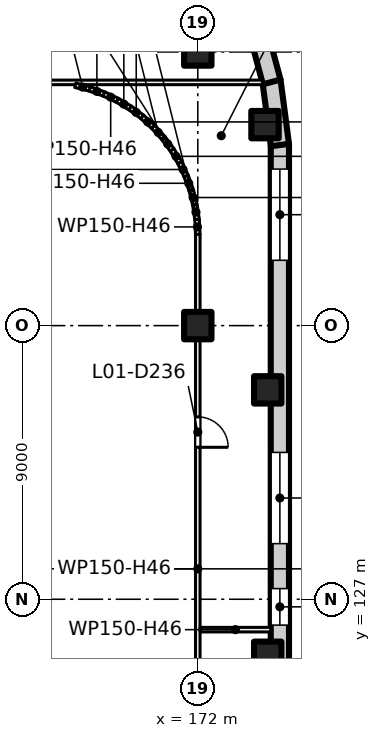
"""IFC4 building model, lengths in metres.
Left out: names, types, materials, properties, quantities, classifications, styles, units other than length and angle.
Written with IfcOpenShell. Run it as: python <this file> out.ifc"""

import sys

from ifc_helpers import new_model, si_unit, direction, frame, frame_2d, origin, origin_2d, place, context, subcontext, project, spatial, rectangle, extrude, element, fill, save


model = new_model("IFC4")
c1 = context("Model", 3, precision=1e-05, world=origin(), true_north=direction((0.0, 1.0)))
c2 = subcontext(c1, "Body", "Model", "MODEL_VIEW")
j1 = project(units=[si_unit("LENGTHUNIT", "METRE"), si_unit("PLANEANGLEUNIT", "RADIAN")], contexts=[c1])
p1 = place(None, origin())
s1 = spatial("IfcSite", under=j1, at=p1, CompositionType="ELEMENT")
p2 = place(p1, origin())
s2 = spatial("IfcBuilding", under=s1, at=p2, CompositionType="ELEMENT")
p3 = place(p2, frame((0.0, 0.0, 7.5)))
s3 = spatial("IfcBuildingStorey", under=s2, at=p3, CompositionType="ELEMENT", Elevation=7.5)
for number, where, z_axis, x_axis in (
    (1, (172.0, 136.0, 0.0), (0.0, 0.0, 1.0), (1.0, 0.0, 0.0)),
    (2, (172.0, 145.0, 0.0), (0.0, 0.0, 1.0), (1.0, 0.0, 0.0)),
    (3, (174.211, 142.611, 0.0), (0.0, 0.0, 1.0), (1.0, 0.0, 0.0)),
    (4, (174.3, 133.887, 0.0), (0.0, 0.0, 1.0), (1.0, 0.0, 0.0)),
    (5, (174.3, 125.157, 0.0), (0.0, 0.0, 1.0), (1.0, 0.0, 0.0)),
):
    element("IfcColumn", number, at=place(p3, frame(where, z_axis=z_axis, x_axis=x_axis)), inside=s3, PredefinedType="COLUMN", context=c2, shape_type="SweptSolid", body=[
        extrude(rectangle(XDim=0.9, YDim=0.9, at=origin_2d()), origin(), (0.0, 0.0, 1.0), 5.0),
    ])
p4 = place(p3, frame((174.7, 141.978, 0.0), z_axis=(0.0, 0.0, 1.0), x_axis=(0.0, -1.0, 0.0)))
e6 = element("IfcWall", 6, at=p4, inside=s3, PredefinedType="SOLIDWALL", context=c2, shape_type="SweptSolid", body=[
    extrude(rectangle(XDim=27.957, YDim=0.6, at=frame_2d((13.978, 0.0))), origin(), (0.0, 0.0, 1.0), 4.6),
])
p5 = place(p4, frame((0.83, 0.0, 0.9)))
e7 = element("IfcOpeningElement", 7, at=p5, cuts=e6, PredefinedType="OPENING", context=c2, shape_type="SweptSolid", body=[
    extrude(rectangle(XDim=3.0, YDim=3.0, at=frame_2d((1.5, 1.5))), frame((0.0, 0.31, 0.0), z_axis=(0.0, -1.0, 0.0), x_axis=(1.0, 0.0, 0.0)), (0.0, 0.0, 1.0), 0.62),
])
p6 = place(p4, frame((10.148, 0.0, 0.9)))
e8 = element("IfcOpeningElement", 8, at=p6, cuts=e6, PredefinedType="OPENING", context=c2, shape_type="SweptSolid", body=[
    extrude(rectangle(XDim=3.0, YDim=3.0, at=frame_2d((1.5, 1.5))), frame((0.0, 0.31, 0.0), z_axis=(0.0, -1.0, 0.0), x_axis=(1.0, 0.0, 0.0)), (0.0, 0.0, 1.0), 0.62),
])
p7 = place(p4, frame((14.628, 0.0, 0.9)))
e9 = element("IfcOpeningElement", 9, at=p7, cuts=e6, PredefinedType="OPENING", context=c2, shape_type="SweptSolid", body=[
    extrude(rectangle(XDim=1.2, YDim=3.0, at=frame_2d((0.6, 1.5))), frame((0.0, 0.31, 0.0), z_axis=(0.0, -1.0, 0.0), x_axis=(1.0, 0.0, 0.0)), (0.0, 0.0, 1.0), 0.62),
])
p8 = place(p4, frame((19.467, 0.0, 0.9)))
e10 = element("IfcOpeningElement", 10, at=p8, cuts=e6, PredefinedType="OPENING", context=c2, shape_type="SweptSolid", body=[
    extrude(rectangle(XDim=3.0, YDim=3.0, at=frame_2d((1.5, 1.5))), frame((0.0, 0.31, 0.0), z_axis=(0.0, -1.0, 0.0), x_axis=(1.0, 0.0, 0.0)), (0.0, 0.0, 1.0), 0.62),
])
p9 = place(p3, frame((174.424, 144.052, 0.0), z_axis=(0.0, 0.0, 1.0), x_axis=(0.130558200013, -0.991440646942, 0.0)))
e11 = element("IfcWall", 11, at=p9, inside=s3, PredefinedType="SOLIDWALL", context=c2, shape_type="SweptSolid", body=[
    extrude(rectangle(XDim=2.132, YDim=0.6, at=frame_2d((1.066, 0.0))), origin(), (0.0, 0.0, 1.0), 4.6),
])
p10 = place(p3, frame((173.908, 145.968, 0.0), z_axis=(0.0, 0.0, 1.0), x_axis=(0.258804467146, -0.965929732323, 0.0)))
e12 = element("IfcWall", 12, at=p10, inside=s3, PredefinedType="SOLIDWALL", context=c2, shape_type="SweptSolid", body=[
    extrude(rectangle(XDim=2.022, YDim=0.6, at=frame_2d((1.011, 0.0))), origin(), (0.0, 0.0, 1.0), 4.6),
])
p11 = place(p3, frame((154.075, 144.0, 0.0), z_axis=(0.0, 0.0, 1.0), x_axis=(1.0, 0.0, 0.0)))
e13 = element("IfcWall", 13, at=p11, inside=s3, PredefinedType="PARTITIONING", context=c2, shape_type="SweptSolid", body=[
    extrude(rectangle(XDim=20.05, YDim=0.15, at=frame_2d((10.025, 0.0))), origin(), (0.0, 0.0, 1.0), 4.6),
])
p12 = place(p11, frame((2.427, 0.0, 0.0)))
e14 = element("IfcOpeningElement", 14, at=p12, cuts=e13, PredefinedType="OPENING", context=c2, shape_type="SweptSolid", body=[
    extrude(rectangle(XDim=1.0, YDim=2.1, at=frame_2d((0.5, 1.05))), frame((0.0, 0.085, 0.0), z_axis=(0.0, -1.0, 0.0), x_axis=(1.0, 0.0, 0.0)), (0.0, 0.0, 1.0), 0.17),
])
p13 = place(p11, frame((9.623, 0.0, 0.0)))
e15 = element("IfcOpeningElement", 15, at=p13, cuts=e13, PredefinedType="OPENING", context=c2, shape_type="SweptSolid", body=[
    extrude(rectangle(XDim=1.0, YDim=2.1, at=frame_2d((0.5, 1.05))), frame((0.0, 0.085, 0.0), z_axis=(0.0, -1.0, 0.0), x_axis=(1.0, 0.0, 0.0)), (0.0, 0.0, 1.0), 0.17),
])
p14 = place(p3, frame((167.971, 143.905, 0.0), z_axis=(0.0, 0.0, 1.0), x_axis=(0.970113715952, -0.242650732785, 0.0)))
e16 = element("IfcWall", 16, at=p14, inside=s3, PredefinedType="PARTITIONING", context=c2, shape_type="SweptSolid", body=[
    extrude(rectangle(XDim=0.499, YDim=0.15, at=frame_2d((0.25, 0.0))), origin(), (0.0, 0.0, 1.0), 4.6),
])
for number, where, z_axis, x_axis in (
    (17, (168.447, 143.786, 0.0), (0.0, 0.0, 1.0), (0.941, -0.337, 0.0)),
    (18, (168.91, 143.621, 0.0), (0.0, 0.0, 1.0), (0.904, -0.428, 0.0)),
):
    element("IfcWall", number, at=place(p3, frame(where, z_axis=z_axis, x_axis=x_axis)), inside=s3, PredefinedType="PARTITIONING", context=c2, shape_type="SweptSolid", body=[
        extrude(rectangle(XDim=0.498, YDim=0.15, at=frame_2d((0.249, 0.0))), origin(), (0.0, 0.0, 1.0), 4.6),
    ])
p15 = place(p3, frame((169.354, 143.412, 0.0), z_axis=(0.0, 0.0, 1.0), x_axis=(0.85671397893, -0.515791778052, 0.0)))
e19 = element("IfcWall", 19, at=p15, inside=s3, PredefinedType="PARTITIONING", context=c2, shape_type="SweptSolid", body=[
    extrude(rectangle(XDim=0.499, YDim=0.15, at=frame_2d((0.249, 0.0))), origin(), (0.0, 0.0, 1.0), 4.6),
])
p16 = place(p3, frame((169.775, 143.159, 0.0), z_axis=(0.0, 0.0, 1.0), x_axis=(0.80404358372, -0.594570362092, 0.0)))
e20 = element("IfcWall", 20, at=p16, inside=s3, PredefinedType="PARTITIONING", context=c2, shape_type="SweptSolid", body=[
    extrude(rectangle(XDim=0.498, YDim=0.15, at=frame_2d((0.249, 0.0))), origin(), (0.0, 0.0, 1.0), 4.6),
])
for number, where, z_axis, x_axis in (
    (21, (170.169, 142.867, 0.0), (0.0, 0.0, 1.0), (0.742, -0.67, 0.0)),
    (22, (170.533, 142.539, 0.0), (0.0, 0.0, 1.0), (0.67, -0.742, 0.0)),
):
    element("IfcWall", number, at=place(p3, frame(where, z_axis=z_axis, x_axis=x_axis)), inside=s3, PredefinedType="PARTITIONING", context=c2, shape_type="SweptSolid", body=[
        extrude(rectangle(XDim=0.499, YDim=0.15, at=frame_2d((0.249, 0.0))), origin(), (0.0, 0.0, 1.0), 4.6),
    ])
p17 = place(p3, frame((170.863, 142.175, 0.0), z_axis=(0.0, 0.0, 1.0), x_axis=(0.594570362092, -0.80404358372, 0.0)))
e23 = element("IfcWall", 23, at=p17, inside=s3, PredefinedType="PARTITIONING", context=c2, shape_type="SweptSolid", body=[
    extrude(rectangle(XDim=0.498, YDim=0.15, at=frame_2d((0.249, 0.0))), origin(), (0.0, 0.0, 1.0), 4.6),
])
p18 = place(p3, frame((171.155, 141.781, 0.0), z_axis=(0.0, 0.0, 1.0), x_axis=(0.515791778052, -0.85671397893, 0.0)))
e24 = element("IfcWall", 24, at=p18, inside=s3, PredefinedType="PARTITIONING", context=c2, shape_type="SweptSolid", body=[
    extrude(rectangle(XDim=0.499, YDim=0.15, at=frame_2d((0.249, 0.0))), origin(), (0.0, 0.0, 1.0), 4.6),
])
for number, where, z_axis, x_axis in (
    (25, (171.408, 141.36, 0.0), (0.0, 0.0, 1.0), (0.428, -0.904, 0.0)),
    (26, (171.618, 140.916, 0.0), (0.0, 0.0, 1.0), (0.337, -0.941, 0.0)),
):
    element("IfcWall", number, at=place(p3, frame(where, z_axis=z_axis, x_axis=x_axis)), inside=s3, PredefinedType="PARTITIONING", context=c2, shape_type="SweptSolid", body=[
        extrude(rectangle(XDim=0.498, YDim=0.15, at=frame_2d((0.249, 0.0))), origin(), (0.0, 0.0, 1.0), 4.6),
    ])
p19 = place(p3, frame((171.784, 140.455, 0.0), z_axis=(0.0, 0.0, 1.0), x_axis=(0.242650732785, -0.970113715952, 0.0)))
e27 = element("IfcWall", 27, at=p19, inside=s3, PredefinedType="PARTITIONING", context=c2, shape_type="SweptSolid", body=[
    extrude(rectangle(XDim=0.499, YDim=0.15, at=frame_2d((0.25, 0.0))), origin(), (0.0, 0.0, 1.0), 4.6),
])
p20 = place(p3, frame((171.903, 139.979, 0.0), z_axis=(0.0, 0.0, 1.0), x_axis=(0.148412307247, -0.988925572052, 0.0)))
e28 = element("IfcWall", 28, at=p20, inside=s3, PredefinedType="PARTITIONING", context=c2, shape_type="SweptSolid", body=[
    extrude(rectangle(XDim=0.499, YDim=0.15, at=frame_2d((0.249, 0.0))), origin(), (0.0, 0.0, 1.0), 4.6),
])
p21 = place(p3, frame((171.976, 139.494, 0.0), z_axis=(0.0, 0.0, 1.0), x_axis=(0.048196018647, -0.998837896651, 0.0)))
e29 = element("IfcWall", 29, at=p21, inside=s3, PredefinedType="PARTITIONING", context=c2, shape_type="SweptSolid", body=[
    extrude(rectangle(XDim=0.496, YDim=0.15, at=frame_2d((0.248, 0.0))), origin(), (0.0, 0.0, 1.0), 4.6),
])
p22 = place(p3, frame((172.0, 139.002, 0.0), z_axis=(0.0, 0.0, 1.0), x_axis=(0.0, -1.0, 0.0)))
e30 = element("IfcWall", 30, at=p22, inside=s3, PredefinedType="PARTITIONING", context=c2, shape_type="SweptSolid", body=[
    extrude(rectangle(XDim=22.004, YDim=0.15, at=frame_2d((11.002, 0.0))), origin(), (0.0, 0.0, 1.0), 4.6),
])
p23 = place(p22, frame((17.0, 0.0, 0.0)))
e31 = element("IfcOpeningElement", 31, at=p23, cuts=e30, PredefinedType="OPENING", context=c2, shape_type="SweptSolid", body=[
    extrude(rectangle(XDim=1.0, YDim=2.1, at=frame_2d((0.5, 1.05))), frame((0.0, 0.085, 0.0), z_axis=(0.0, -1.0, 0.0), x_axis=(1.0, 0.0, 0.0)), (0.0, 0.0, 1.0), 0.17),
])
p24 = place(p22, frame((6.004, 0.0, 0.0)))
e32 = element("IfcOpeningElement", 32, at=p24, cuts=e30, PredefinedType="OPENING", context=c2, shape_type="SweptSolid", body=[
    extrude(rectangle(XDim=1.0, YDim=2.1, at=frame_2d((0.5, 1.05))), frame((0.0, 0.085, 0.0), z_axis=(0.0, -1.0, 0.0), x_axis=(1.0, 0.0, 0.0)), (0.0, 0.0, 1.0), 0.17),
])
p25 = place(p3, frame((172.075, 126.0, 0.0), z_axis=(0.0, 0.0, 1.0), x_axis=(1.0, 0.0, 0.0)))
e33 = element("IfcWall", 33, at=p25, inside=s3, PredefinedType="PARTITIONING", context=c2, shape_type="SweptSolid", body=[
    extrude(rectangle(XDim=2.325, YDim=0.15, at=frame_2d((1.163, 0.0))), origin(), (0.0, 0.0, 1.0), 4.6),
])
p26 = place(p5, origin())
e34 = element("IfcWindow", 34, at=p26, inside=s3, PartitioningType="SINGLE_PANEL", PredefinedType="WINDOW", context=c2, shape_type="SweptSolid", body=[
    extrude(rectangle(XDim=3.0, YDim=3.0, at=frame_2d((1.5, 1.5))), frame((0.0, 0.03, 0.0), z_axis=(0.0, -1.0, 0.0), x_axis=(1.0, 0.0, 0.0)), (0.0, 0.0, 1.0), 0.06),
])
fill(e7, e34)
p27 = place(p6, origin())
e35 = element("IfcWindow", 35, at=p27, inside=s3, PartitioningType="SINGLE_PANEL", PredefinedType="WINDOW", context=c2, shape_type="SweptSolid", body=[
    extrude(rectangle(XDim=3.0, YDim=3.0, at=frame_2d((1.5, 1.5))), frame((0.0, 0.03, 0.0), z_axis=(0.0, -1.0, 0.0), x_axis=(1.0, 0.0, 0.0)), (0.0, 0.0, 1.0), 0.06),
])
fill(e8, e35)
p28 = place(p7, origin())
e36 = element("IfcWindow", 36, at=p28, inside=s3, PartitioningType="SINGLE_PANEL", PredefinedType="WINDOW", context=c2, shape_type="SweptSolid", body=[
    extrude(rectangle(XDim=1.2, YDim=3.0, at=frame_2d((0.6, 1.5))), frame((0.0, 0.03, 0.0), z_axis=(0.0, -1.0, 0.0), x_axis=(1.0, 0.0, 0.0)), (0.0, 0.0, 1.0), 0.06),
])
fill(e9, e36)
p29 = place(p24, origin())
e37 = element("IfcDoor", 37, at=p29, inside=s3, OperationType="SINGLE_SWING_RIGHT", PredefinedType="DOOR", context=c2, shape_type="SweptSolid", body=[
    extrude(rectangle(XDim=1.0, YDim=2.1, at=frame_2d((0.5, 1.05))), frame((0.0, 0.025, 0.0), z_axis=(0.0, -1.0, 0.0), x_axis=(1.0, 0.0, 0.0)), (0.0, 0.0, 1.0), 0.05),
])
fill(e32, e37)
save(model, sys.argv[1])
